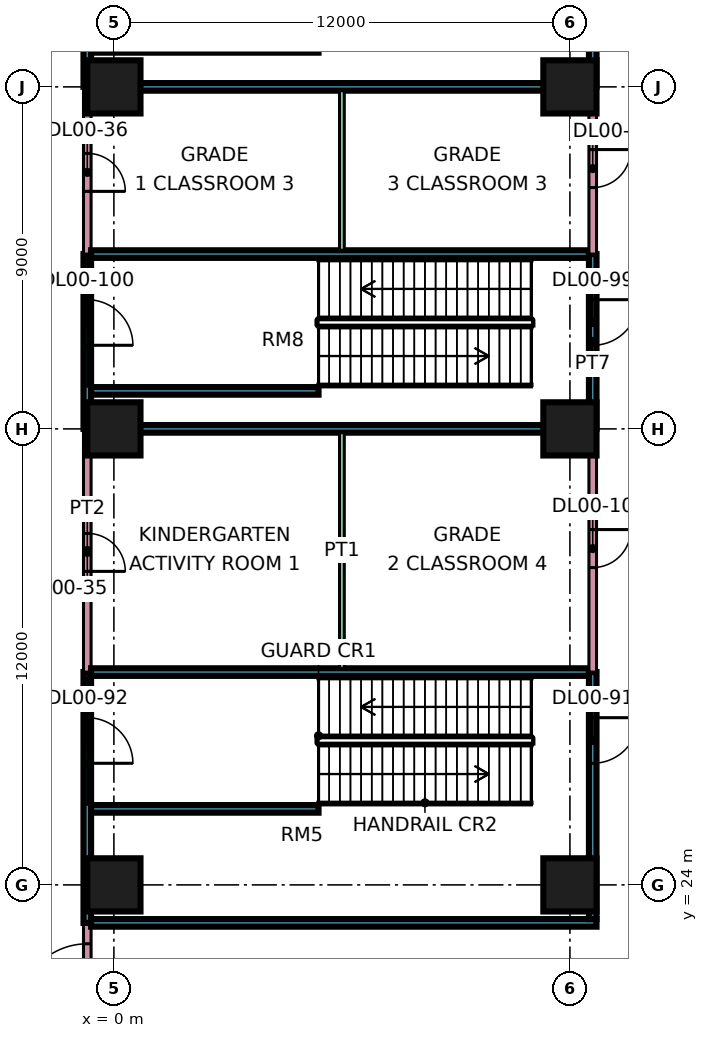
"""IFC4 building model, lengths in metres.
Left out: names, types, materials, properties, quantities, classifications, styles, units other than length and angle.
Written with IfcOpenShell. Run it as: python <this file> out.ifc"""

import sys

from ifc_helpers import new_model, si_unit, direction, frame, frame_2d, origin, origin_2d, place, context, subcontext, project, spatial, rectangle, extrude, element, fill, save


model = new_model("IFC4")
c1 = context("Model", 3, precision=1e-05, world=origin(), true_north=direction((0.0, 1.0)))
c2 = subcontext(c1, "Body", "Model", "MODEL_VIEW")
j1 = project(units=[si_unit("LENGTHUNIT", "METRE"), si_unit("PLANEANGLEUNIT", "RADIAN")], contexts=[c1])
p1 = place(None, origin())
s1 = spatial("IfcSite", under=j1, at=p1, CompositionType="ELEMENT")
p2 = place(p1, origin())
s2 = spatial("IfcBuilding", under=s1, at=p2, CompositionType="ELEMENT")
p3 = place(p2, origin())
s3 = spatial("IfcBuildingStorey", under=s2, at=p3, CompositionType="ELEMENT", Elevation=0.0)
for number, where, z_axis, x_axis in (
    (1, (0.0, 24.0, 0.0), (0.0, 0.0, 1.0), (1.0, 0.0, 0.0)),
    (2, (12.0, 24.0, 0.0), (0.0, 0.0, 1.0), (1.0, 0.0, 0.0)),
    (3, (0.0, 36.0, 0.0), (0.0, 0.0, 1.0), (1.0, 0.0, 0.0)),
    (4, (12.0, 36.0, 0.0), (0.0, 0.0, 1.0), (1.0, 0.0, 0.0)),
    (5, (0.0, 45.0, 0.0), (0.0, 0.0, 1.0), (1.0, 0.0, 0.0)),
    (6, (12.0, 45.0, 0.0), (0.0, 0.0, 1.0), (1.0, 0.0, 0.0)),
):
    element("IfcColumn", number, at=place(p3, frame(where, z_axis=z_axis, x_axis=x_axis)), inside=s3, PredefinedType="COLUMN", context=c2, shape_type="SweptSolid", body=[
        extrude(rectangle(XDim=1.4, YDim=1.4, at=origin_2d()), origin(), (0.0, 0.0, 1.0), 7.2),
    ])
p4 = place(p3, frame((-0.7, -0.6, 0.0), z_axis=(0.0, 0.0, 1.0), x_axis=(0.0, 1.0, 0.0)))
e7 = element("IfcWall", 7, at=p4, inside=s3, PredefinedType="PARTITIONING", context=c2, shape_type="SweptSolid", body=[
    extrude(rectangle(XDim=23.6, YDim=0.2, at=frame_2d((11.8, 0.0))), origin(), (0.0, 0.0, 1.0), 6.8),
])
p5 = place(p4, frame((21.25, 0.0, 0.0)))
e8 = element("IfcOpeningElement", 8, at=p5, cuts=e7, PredefinedType="OPENING", context=c2, shape_type="SweptSolid", body=[
    extrude(rectangle(XDim=1.8, YDim=2.1, at=frame_2d((0.9, 1.05))), frame((0.0, 0.11, 0.0), z_axis=(0.0, -1.0, 0.0), x_axis=(1.0, 0.0, 0.0)), (0.0, 0.0, 1.0), 0.22),
])
p6 = place(p4, frame((13.5, 0.0, 0.0)))
e9 = element("IfcOpeningElement", 9, at=p6, cuts=e7, PredefinedType="OPENING", context=c2, shape_type="SweptSolid", body=[
    extrude(rectangle(XDim=1.0, YDim=2.1, at=frame_2d((0.5, 1.05))), frame((0.0, 0.11, 0.0), z_axis=(0.0, -1.0, 0.0), x_axis=(1.0, 0.0, 0.0)), (0.0, 0.0, 1.0), 0.22),
])
p7 = place(p3, frame((-0.7, 23.0, 0.0), z_axis=(0.0, 0.0, 1.0), x_axis=(0.0, 1.0, 0.0)))
e10 = element("IfcWall", 10, at=p7, inside=s3, PredefinedType="SOLIDWALL", context=c2, shape_type="SweptSolid", body=[
    extrude(rectangle(XDim=6.6, YDim=0.2, at=frame_2d((3.3, 0.0))), origin(), (0.0, 0.0, 1.0), 6.8),
])
p8 = place(p7, frame((4.2, 0.0, 0.0)))
e11 = element("IfcOpeningElement", 11, at=p8, cuts=e10, PredefinedType="OPENING", context=c2, shape_type="SweptSolid", body=[
    extrude(rectangle(XDim=1.2, YDim=2.1, at=frame_2d((0.6, 1.05))), frame((0.0, 0.11, 0.0), z_axis=(0.0, -1.0, 0.0), x_axis=(1.0, 0.0, 0.0)), (0.0, 0.0, 1.0), 0.22),
])
p9 = place(p3, frame((-0.7, 29.6, 0.0), z_axis=(0.0, 0.0, 1.0), x_axis=(0.0, 1.0, 0.0)))
e12 = element("IfcWall", 12, at=p9, inside=s3, PredefinedType="PARTITIONING", context=c2, shape_type="SweptSolid", body=[
    extrude(rectangle(XDim=6.4, YDim=0.2, at=frame_2d((3.2, 0.0))), origin(), (0.0, 0.0, 1.0), 6.8),
])
p10 = place(p9, frame((2.65, 0.0, 0.0)))
e13 = element("IfcOpeningElement", 13, at=p10, cuts=e12, PredefinedType="OPENING", context=c2, shape_type="SweptSolid", body=[
    extrude(rectangle(XDim=1.0, YDim=2.1, at=frame_2d((0.5, 1.05))), frame((0.0, 0.11, 0.0), z_axis=(0.0, -1.0, 0.0), x_axis=(1.0, 0.0, 0.0)), (0.0, 0.0, 1.0), 0.22),
])
p11 = place(p3, frame((-0.7, 36.0, 0.0), z_axis=(0.0, 0.0, 1.0), x_axis=(0.0, 1.0, 0.0)))
e14 = element("IfcWall", 14, at=p11, inside=s3, PredefinedType="SOLIDWALL", context=c2, shape_type="SweptSolid", body=[
    extrude(rectangle(XDim=4.6, YDim=0.2, at=frame_2d((2.3, 0.0))), origin(), (0.0, 0.0, 1.0), 6.8),
])
p12 = place(p11, frame((2.2, 0.0, 0.0)))
e15 = element("IfcOpeningElement", 15, at=p12, cuts=e14, PredefinedType="OPENING", context=c2, shape_type="SweptSolid", body=[
    extrude(rectangle(XDim=1.2, YDim=2.1, at=frame_2d((0.6, 1.05))), frame((0.0, 0.11, 0.0), z_axis=(0.0, -1.0, 0.0), x_axis=(1.0, 0.0, 0.0)), (0.0, 0.0, 1.0), 0.22),
])
p13 = place(p3, frame((-0.7, 40.6, 0.0), z_axis=(0.0, 0.0, 1.0), x_axis=(0.0, 1.0, 0.0)))
e16 = element("IfcWall", 16, at=p13, inside=s3, PredefinedType="PARTITIONING", context=c2, shape_type="SweptSolid", body=[
    extrude(rectangle(XDim=4.4, YDim=0.2, at=frame_2d((2.2, 0.0))), origin(), (0.0, 0.0, 1.0), 6.8),
])
p14 = place(p13, frame((1.65, 0.0, 0.0)))
e17 = element("IfcOpeningElement", 17, at=p14, cuts=e16, PredefinedType="OPENING", context=c2, shape_type="SweptSolid", body=[
    extrude(rectangle(XDim=1.0, YDim=2.1, at=frame_2d((0.5, 1.05))), frame((0.0, 0.11, 0.0), z_axis=(0.0, -1.0, 0.0), x_axis=(1.0, 0.0, 0.0)), (0.0, 0.0, 1.0), 0.22),
])
p15 = place(p3, frame((-0.7, 45.0, 0.0), z_axis=(0.0, 0.0, 1.0), x_axis=(0.0, 1.0, 0.0)))
e18 = element("IfcWall", 18, at=p15, inside=s3, PredefinedType="SOLIDWALL", context=c2, shape_type="SweptSolid", body=[
    extrude(rectangle(XDim=4.6, YDim=0.2, at=frame_2d((2.3, 0.0))), origin(), (0.0, 0.0, 1.0), 6.8),
])
p16 = place(p15, frame((2.2, 0.0, 0.0)))
e19 = element("IfcOpeningElement", 19, at=p16, cuts=e18, PredefinedType="OPENING", context=c2, shape_type="SweptSolid", body=[
    extrude(rectangle(XDim=1.2, YDim=2.1, at=frame_2d((0.6, 1.05))), frame((0.0, 0.11, 0.0), z_axis=(0.0, -1.0, 0.0), x_axis=(1.0, 0.0, 0.0)), (0.0, 0.0, 1.0), 0.22),
])
p17 = place(p3, frame((-0.6, 23.0, 0.0), z_axis=(0.0, 0.0, 1.0), x_axis=(1.0, 0.0, 0.0)))
e20 = element("IfcWall", 20, at=p17, inside=s3, PredefinedType="SOLIDWALL", context=c2, shape_type="SweptSolid", body=[
    extrude(rectangle(XDim=13.3, YDim=0.2, at=frame_2d((6.65, 0.0))), origin(), (0.0, 0.0, 1.0), 6.8),
])
for number, where, z_axis, x_axis in (
    (21, (-0.6, 29.6, 0.0), (0.0, 0.0, 1.0), (1.0, 0.0, 0.0)),
    (22, (-0.6, 36.0, 0.0), (0.0, 0.0, 1.0), (1.0, 0.0, 0.0)),
    (23, (-0.6, 40.6, 0.0), (0.0, 0.0, 1.0), (1.0, 0.0, 0.0)),
    (24, (-0.6, 45.0, 0.0), (0.0, 0.0, 1.0), (1.0, 0.0, 0.0)),
):
    element("IfcWall", number, at=place(p3, frame(where, z_axis=z_axis, x_axis=x_axis)), inside=s3, PredefinedType="SOLIDWALL", context=c2, shape_type="SweptSolid", body=[
        extrude(rectangle(XDim=13.1, YDim=0.2, at=frame_2d((6.55, 0.0))), origin(), (0.0, 0.0, 1.0), 6.8),
    ])
p18 = place(p3, frame((6.0, 29.7, 0.0), z_axis=(0.0, 0.0, 1.0), x_axis=(0.0, 1.0, 0.0)))
e25 = element("IfcWall", 25, at=p18, inside=s3, PredefinedType="PARTITIONING", context=c2, shape_type="SweptSolid", body=[
    extrude(rectangle(XDim=6.2, YDim=0.125, at=frame_2d((3.1, 0.0))), origin(), (0.0, 0.0, 1.0), 6.8),
])
p19 = place(p3, frame((6.0, 40.7, 0.0), z_axis=(0.0, 0.0, 1.0), x_axis=(0.0, 1.0, 0.0)))
e26 = element("IfcWall", 26, at=p19, inside=s3, PredefinedType="PARTITIONING", context=c2, shape_type="SweptSolid", body=[
    extrude(rectangle(XDim=4.2, YDim=0.125, at=frame_2d((2.1, 0.0))), origin(), (0.0, 0.0, 1.0), 6.8),
])
p20 = place(p3, frame((12.6, 23.1, 0.0), z_axis=(0.0, 0.0, 1.0), x_axis=(0.0, 1.0, 0.0)))
e27 = element("IfcWall", 27, at=p20, inside=s3, PredefinedType="SOLIDWALL", context=c2, shape_type="SweptSolid", body=[
    extrude(rectangle(XDim=6.5, YDim=0.2, at=frame_2d((3.25, 0.0))), origin(), (0.0, 0.0, 1.0), 6.8),
])
p21 = place(p20, frame((4.1, 0.0, 0.0)))
e28 = element("IfcOpeningElement", 28, at=p21, cuts=e27, PredefinedType="OPENING", context=c2, shape_type="SweptSolid", body=[
    extrude(rectangle(XDim=1.2, YDim=2.1, at=frame_2d((0.6, 1.05))), frame((0.0, 0.11, 0.0), z_axis=(0.0, -1.0, 0.0), x_axis=(1.0, 0.0, 0.0)), (0.0, 0.0, 1.0), 0.22),
])
p22 = place(p3, frame((12.6, 29.6, 0.0), z_axis=(0.0, 0.0, 1.0), x_axis=(0.0, 1.0, 0.0)))
e29 = element("IfcWall", 29, at=p22, inside=s3, PredefinedType="PARTITIONING", context=c2, shape_type="SweptSolid", body=[
    extrude(rectangle(XDim=6.4, YDim=0.2, at=frame_2d((3.2, 0.0))), origin(), (0.0, 0.0, 1.0), 6.8),
])
p23 = place(p22, frame((2.75, 0.0, 0.0)))
e30 = element("IfcOpeningElement", 30, at=p23, cuts=e29, PredefinedType="OPENING", context=c2, shape_type="SweptSolid", body=[
    extrude(rectangle(XDim=1.0, YDim=2.1, at=frame_2d((0.5, 1.05))), frame((0.0, 0.11, 0.0), z_axis=(0.0, -1.0, 0.0), x_axis=(1.0, 0.0, 0.0)), (0.0, 0.0, 1.0), 0.22),
])
p24 = place(p3, frame((12.6, 36.0, 0.0), z_axis=(0.0, 0.0, 1.0), x_axis=(0.0, 1.0, 0.0)))
e31 = element("IfcWall", 31, at=p24, inside=s3, PredefinedType="SOLIDWALL", context=c2, shape_type="SweptSolid", body=[
    extrude(rectangle(XDim=4.6, YDim=0.2, at=frame_2d((2.3, 0.0))), origin(), (0.0, 0.0, 1.0), 6.8),
])
p25 = place(p24, frame((2.2, 0.0, 0.0)))
e32 = element("IfcOpeningElement", 32, at=p25, cuts=e31, PredefinedType="OPENING", context=c2, shape_type="SweptSolid", body=[
    extrude(rectangle(XDim=1.2, YDim=2.1, at=frame_2d((0.6, 1.05))), frame((0.0, 0.11, 0.0), z_axis=(0.0, -1.0, 0.0), x_axis=(1.0, 0.0, 0.0)), (0.0, 0.0, 1.0), 0.22),
])
p26 = place(p3, frame((12.6, 40.6, 0.0), z_axis=(0.0, 0.0, 1.0), x_axis=(0.0, 1.0, 0.0)))
e33 = element("IfcWall", 33, at=p26, inside=s3, PredefinedType="PARTITIONING", context=c2, shape_type="SweptSolid", body=[
    extrude(rectangle(XDim=4.4, YDim=0.2, at=frame_2d((2.2, 0.0))), origin(), (0.0, 0.0, 1.0), 6.8),
])
p27 = place(p26, frame((1.75, 0.0, 0.0)))
e34 = element("IfcOpeningElement", 34, at=p27, cuts=e33, PredefinedType="OPENING", context=c2, shape_type="SweptSolid", body=[
    extrude(rectangle(XDim=1.0, YDim=2.1, at=frame_2d((0.5, 1.05))), frame((0.0, 0.11, 0.0), z_axis=(0.0, -1.0, 0.0), x_axis=(1.0, 0.0, 0.0)), (0.0, 0.0, 1.0), 0.22),
])
p28 = place(p3, frame((12.6, 45.0, 0.0), z_axis=(0.0, 0.0, 1.0), x_axis=(0.0, 1.0, 0.0)))
e35 = element("IfcWall", 35, at=p28, inside=s3, PredefinedType="SOLIDWALL", context=c2, shape_type="SweptSolid", body=[
    extrude(rectangle(XDim=4.6, YDim=0.2, at=frame_2d((2.3, 0.0))), origin(), (0.0, 0.0, 1.0), 6.8),
])
p29 = place(p28, frame((2.2, 0.0, 0.0)))
e36 = element("IfcOpeningElement", 36, at=p29, cuts=e35, PredefinedType="OPENING", context=c2, shape_type="SweptSolid", body=[
    extrude(rectangle(XDim=1.2, YDim=2.1, at=frame_2d((0.6, 1.05))), frame((0.0, 0.11, 0.0), z_axis=(0.0, -1.0, 0.0), x_axis=(1.0, 0.0, 0.0)), (0.0, 0.0, 1.0), 0.22),
])
for number, where, z_axis, x_axis in (
    (37, (-0.6, 46.0, 0.0), (0.0, 0.0, 1.0), (1.0, 0.0, 0.0)),
    (38, (-0.6, 26.0, 0.0), (0.0, 0.0, 1.0), (1.0, 0.0, 0.0)),
    (39, (-0.6, 37.0, 0.0), (0.0, 0.0, 1.0), (1.0, 0.0, 0.0)),
):
    element("IfcWall", number, at=place(p3, frame(where, z_axis=z_axis, x_axis=x_axis)), inside=s3, PredefinedType="SOLIDWALL", context=c2, shape_type="SweptSolid", body=[
        extrude(rectangle(XDim=5.985, YDim=0.2, at=frame_2d((2.993, 0.0))), origin(), (0.0, 0.0, 1.0), 6.8),
    ])
p30 = place(p23, origin())
e40 = element("IfcDoor", 40, at=p30, inside=s3, OperationType="SINGLE_SWING_RIGHT", PredefinedType="DOOR", context=c2, shape_type="SweptSolid", body=[
    extrude(rectangle(XDim=1.0, YDim=2.1, at=frame_2d((0.5, 1.05))), frame((0.0, 0.025, 0.0), z_axis=(0.0, -1.0, 0.0), x_axis=(1.0, 0.0, 0.0)), (0.0, 0.0, 1.0), 0.05),
])
fill(e30, e40)
p31 = place(p27, origin())
e41 = element("IfcDoor", 41, at=p31, inside=s3, OperationType="SINGLE_SWING_RIGHT", PredefinedType="DOOR", context=c2, shape_type="SweptSolid", body=[
    extrude(rectangle(XDim=1.0, YDim=2.1, at=frame_2d((0.5, 1.05))), frame((0.0, 0.025, 0.0), z_axis=(0.0, -1.0, 0.0), x_axis=(1.0, 0.0, 0.0)), (0.0, 0.0, 1.0), 0.05),
])
fill(e34, e41)
p32 = place(p10, frame((1.0, 0.0, 0.0), z_axis=(0.0, 0.0, 1.0), x_axis=(-1.0, 0.0, 0.0)))
e42 = element("IfcDoor", 42, at=p32, inside=s3, OperationType="SINGLE_SWING_LEFT", PredefinedType="DOOR", context=c2, shape_type="SweptSolid", body=[
    extrude(rectangle(XDim=1.0, YDim=2.1, at=frame_2d((0.5, 1.05))), frame((0.0, 0.025, 0.0), z_axis=(0.0, -1.0, 0.0), x_axis=(1.0, 0.0, 0.0)), (0.0, 0.0, 1.0), 0.05),
])
fill(e13, e42)
p33 = place(p14, frame((1.0, 0.0, 0.0), z_axis=(0.0, 0.0, 1.0), x_axis=(-1.0, 0.0, 0.0)))
e43 = element("IfcDoor", 43, at=p33, inside=s3, OperationType="SINGLE_SWING_LEFT", PredefinedType="DOOR", context=c2, shape_type="SweptSolid", body=[
    extrude(rectangle(XDim=1.0, YDim=2.1, at=frame_2d((0.5, 1.05))), frame((0.0, 0.025, 0.0), z_axis=(0.0, -1.0, 0.0), x_axis=(1.0, 0.0, 0.0)), (0.0, 0.0, 1.0), 0.05),
])
fill(e17, e43)
p34 = place(p5, origin())
e44 = element("IfcDoor", 44, at=p34, inside=s3, OperationType="DOUBLE_DOOR_SINGLE_SWING", PredefinedType="DOOR", context=c2, shape_type="SweptSolid", body=[
    extrude(rectangle(XDim=1.8, YDim=2.1, at=frame_2d((0.9, 1.05))), frame((0.0, 0.025, 0.0), z_axis=(0.0, -1.0, 0.0), x_axis=(1.0, 0.0, 0.0)), (0.0, 0.0, 1.0), 0.05),
])
fill(e8, e44)
p35 = place(p21, origin())
e45 = element("IfcDoor", 45, at=p35, inside=s3, OperationType="SINGLE_SWING_RIGHT", PredefinedType="DOOR", context=c2, shape_type="SweptSolid", body=[
    extrude(rectangle(XDim=1.2, YDim=2.1, at=frame_2d((0.6, 1.05))), frame((0.0, 0.025, 0.0), z_axis=(0.0, -1.0, 0.0), x_axis=(1.0, 0.0, 0.0)), (0.0, 0.0, 1.0), 0.05),
])
fill(e28, e45)
p36 = place(p8, frame((1.2, 0.0, 0.0), z_axis=(0.0, 0.0, 1.0), x_axis=(-1.0, 0.0, 0.0)))
e46 = element("IfcDoor", 46, at=p36, inside=s3, OperationType="SINGLE_SWING_LEFT", PredefinedType="DOOR", context=c2, shape_type="SweptSolid", body=[
    extrude(rectangle(XDim=1.2, YDim=2.1, at=frame_2d((0.6, 1.05))), frame((0.0, 0.025, 0.0), z_axis=(0.0, -1.0, 0.0), x_axis=(1.0, 0.0, 0.0)), (0.0, 0.0, 1.0), 0.05),
])
fill(e11, e46)
p37 = place(p25, origin())
e47 = element("IfcDoor", 47, at=p37, inside=s3, OperationType="SINGLE_SWING_RIGHT", PredefinedType="DOOR", context=c2, shape_type="SweptSolid", body=[
    extrude(rectangle(XDim=1.2, YDim=2.1, at=frame_2d((0.6, 1.05))), frame((0.0, 0.025, 0.0), z_axis=(0.0, -1.0, 0.0), x_axis=(1.0, 0.0, 0.0)), (0.0, 0.0, 1.0), 0.05),
])
fill(e32, e47)
p38 = place(p12, frame((1.2, 0.0, 0.0), z_axis=(0.0, 0.0, 1.0), x_axis=(-1.0, 0.0, 0.0)))
e48 = element("IfcDoor", 48, at=p38, inside=s3, OperationType="SINGLE_SWING_LEFT", PredefinedType="DOOR", context=c2, shape_type="SweptSolid", body=[
    extrude(rectangle(XDim=1.2, YDim=2.1, at=frame_2d((0.6, 1.05))), frame((0.0, 0.025, 0.0), z_axis=(0.0, -1.0, 0.0), x_axis=(1.0, 0.0, 0.0)), (0.0, 0.0, 1.0), 0.05),
])
fill(e15, e48)
save(model, sys.argv[1])
